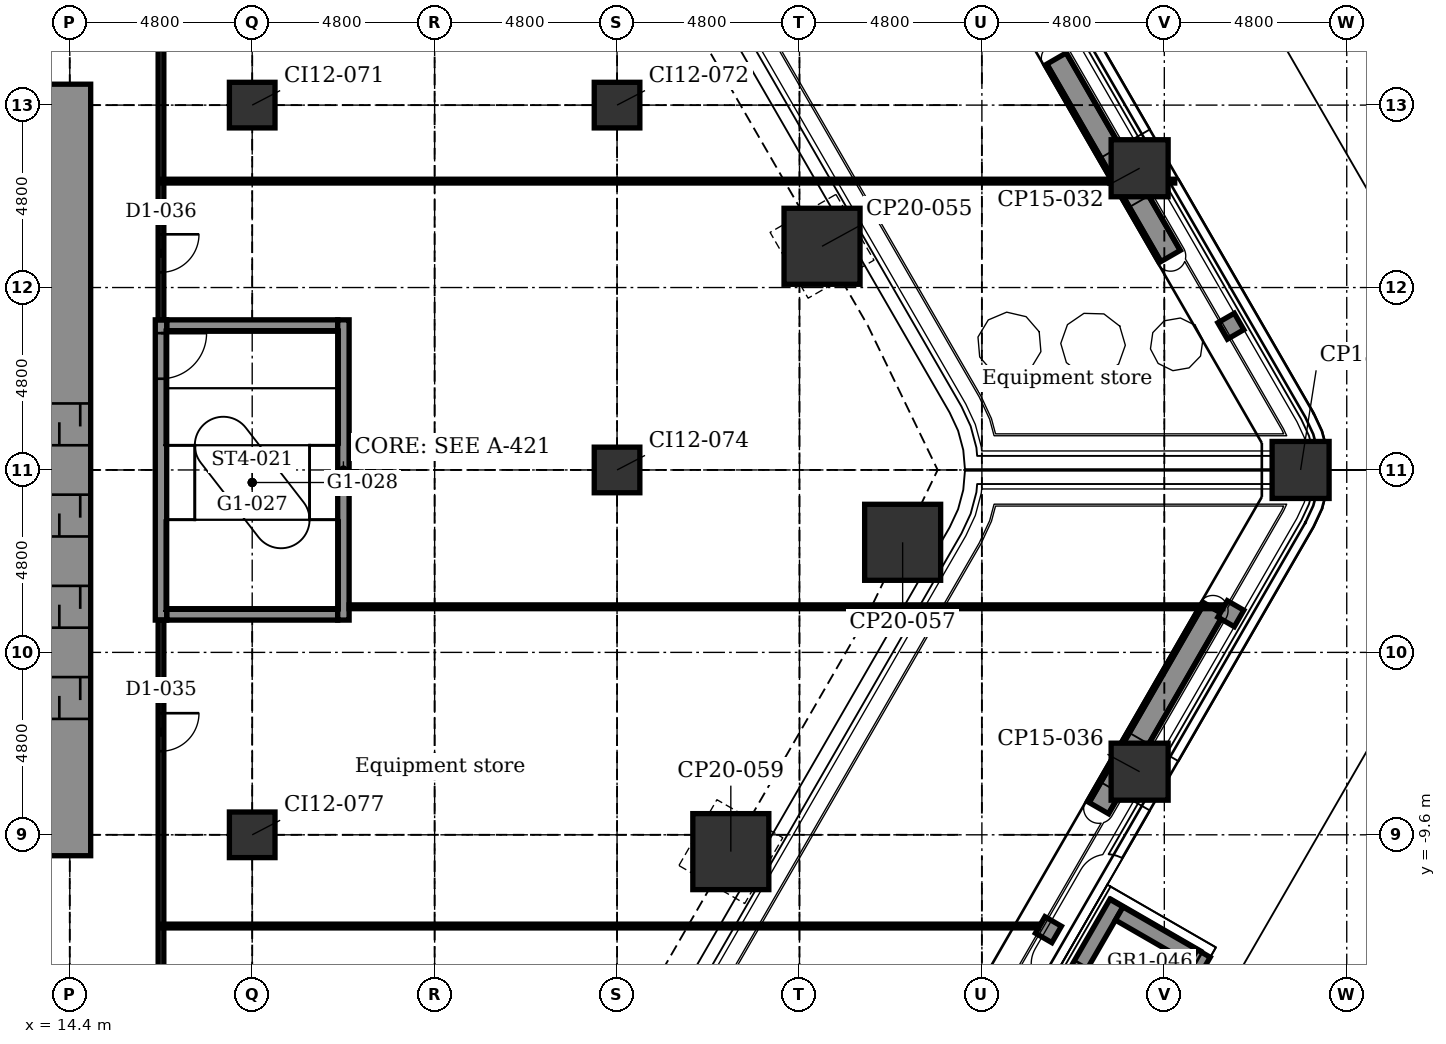
"""IFC4 building model, lengths in metres.
Left out: names, types, materials, properties, quantities, classifications, styles, units other than length and angle.
Written with IfcOpenShell. Run it as: python <this file> out.ifc"""

import sys

from ifc_helpers import new_model, si_unit, direction, frame, frame_2d, origin, origin_2d, place, context, subcontext, project, spatial, rectangle, extrude, element, fill, save


model = new_model("IFC4")
c1 = context("Model", 3, precision=1e-05, world=origin(), true_north=direction((0.0, 1.0)))
c2 = subcontext(c1, "Body", "Model", "MODEL_VIEW")
j1 = project(units=[si_unit("LENGTHUNIT", "METRE"), si_unit("PLANEANGLEUNIT", "RADIAN")], contexts=[c1])
p1 = place(None, origin())
s1 = spatial("IfcSite", under=j1, at=p1, CompositionType="ELEMENT")
p2 = place(p1, origin())
s2 = spatial("IfcBuilding", under=s1, at=p2, CompositionType="ELEMENT")
p3 = place(p2, frame((0.0, 0.0, 12.4)))
s3 = spatial("IfcBuildingStorey", under=s2, at=p3, CompositionType="ELEMENT", Elevation=12.4)
for number, where, z_axis, x_axis in (
    (1, (42.551, 7.939, -0.3), (0.0, 0.0, 1.0), (0.866, 0.5, 0.0)),
    (2, (46.786, 0.0, -0.3), (0.0, 0.0, 1.0), (1.0, 0.0, 0.0)),
    (3, (42.551, -7.939, -0.3), (0.0, 0.0, 1.0), (0.5, 0.866, 0.0)),
):
    element("IfcColumn", number, at=place(p3, frame(where, z_axis=z_axis, x_axis=x_axis)), inside=s3, PredefinedType="COLUMN", context=c2, shape_type="SweptSolid", body=[
        extrude(rectangle(XDim=1.5, YDim=1.5, at=origin_2d()), origin(), (0.0, 0.0, 1.0), 5.05),
    ])
for number, where, z_axis, x_axis in (
    (4, (34.194, 5.885, -0.3), (0.0, 0.0, 1.0), (0.866, 0.5, 0.0)),
    (5, (36.315, -1.904, -0.3), (0.0, 0.0, 1.0), (1.0, 0.0, 0.0)),
    (6, (31.794, -10.042, -0.3), (0.0, 0.0, 1.0), (0.5, 0.866, 0.0)),
):
    element("IfcColumn", number, at=place(p3, frame(where, z_axis=z_axis, x_axis=x_axis)), inside=s3, PredefinedType="COLUMN", context=c2, shape_type="SweptSolid", body=[
        extrude(rectangle(XDim=2.0, YDim=2.0, at=origin_2d()), origin(), (0.0, 0.0, 1.0), 5.05),
    ])
for number, where, z_axis, x_axis in (
    (7, (19.2, -9.6, -0.3), (0.0, 0.0, 1.0), (1.0, 0.0, 0.0)),
    (8, (19.2, 9.6, -0.3), (0.0, 0.0, 1.0), (1.0, 0.0, 0.0)),
    (9, (28.8, 0.0, -0.3), (0.0, 0.0, 1.0), (1.0, 0.0, 0.0)),
    (10, (28.8, 9.6, -0.3), (0.0, 0.0, 1.0), (1.0, 0.0, 0.0)),
):
    element("IfcColumn", number, at=place(p3, frame(where, z_axis=z_axis, x_axis=x_axis)), inside=s3, PredefinedType="COLUMN", context=c2, shape_type="SweptSolid", body=[
        extrude(rectangle(XDim=1.2, YDim=1.2, at=origin_2d()), origin(), (0.0, 0.0, 1.0), 5.05),
    ])
for number, where, z_axis, x_axis in (
    (11, (16.95, -3.8, -0.3), (0.0, 0.0, 1.0), (1.0, 0.0, 0.0)),
    (12, (16.95, 3.8, -0.3), (0.0, 0.0, 1.0), (1.0, 0.0, 0.0)),
):
    element("IfcWall", number, at=place(p3, frame(where, z_axis=z_axis, x_axis=x_axis)), inside=s3, PredefinedType="STANDARD", context=c2, shape_type="SweptSolid", body=[
        extrude(rectangle(XDim=4.5, YDim=0.3, at=frame_2d((2.25, 0.0))), origin(), (0.0, 0.0, 1.0), 5.05),
    ])
p4 = place(p3, frame((14.4, -10.15, -0.3), z_axis=(0.0, 0.0, 1.0), x_axis=(0.0, 1.0, 0.0)))
e13 = element("IfcWall", 13, at=p4, inside=s3, PredefinedType="SHEAR", context=c2, shape_type="SweptSolid", body=[
    extrude(rectangle(XDim=20.3, YDim=1.1, at=frame_2d((10.15, 0.0))), origin(), (0.0, 0.0, 1.0), 5.05),
])
p5 = place(p4, frame((3.6, 0.0, 0.3)))
e14 = element("IfcOpeningElement", 14, at=p5, cuts=e13, PredefinedType="OPENING", context=c2, shape_type="SweptSolid", body=[
    extrude(rectangle(XDim=1.1, YDim=2.1, at=frame_2d((0.55, 1.05))), frame((0.0, 0.56, 0.0), z_axis=(0.0, -1.0, 0.0), x_axis=(1.0, 0.0, 0.0)), (0.0, 0.0, 1.0), 1.12),
])
p6 = place(p4, frame((6.0, 0.0, 0.3)))
e15 = element("IfcOpeningElement", 15, at=p6, cuts=e13, PredefinedType="OPENING", context=c2, shape_type="SweptSolid", body=[
    extrude(rectangle(XDim=1.1, YDim=2.1, at=frame_2d((0.55, 1.05))), frame((0.0, 0.56, 0.0), z_axis=(0.0, -1.0, 0.0), x_axis=(1.0, 0.0, 0.0)), (0.0, 0.0, 1.0), 1.12),
])
p7 = place(p4, frame((8.4, 0.0, 0.3)))
e16 = element("IfcOpeningElement", 16, at=p7, cuts=e13, PredefinedType="OPENING", context=c2, shape_type="SweptSolid", body=[
    extrude(rectangle(XDim=1.1, YDim=2.1, at=frame_2d((0.55, 1.05))), frame((0.0, 0.56, 0.0), z_axis=(0.0, -1.0, 0.0), x_axis=(1.0, 0.0, 0.0)), (0.0, 0.0, 1.0), 1.12),
])
p8 = place(p4, frame((10.8, 0.0, 0.3)))
e17 = element("IfcOpeningElement", 17, at=p8, cuts=e13, PredefinedType="OPENING", context=c2, shape_type="SweptSolid", body=[
    extrude(rectangle(XDim=1.1, YDim=2.1, at=frame_2d((0.55, 1.05))), frame((0.0, 0.56, 0.0), z_axis=(0.0, -1.0, 0.0), x_axis=(1.0, 0.0, 0.0)), (0.0, 0.0, 1.0), 1.12),
])
p9 = place(p3, frame((16.8, -3.95, -0.3), z_axis=(0.0, 0.0, 1.0), x_axis=(0.0, 1.0, 0.0)))
e18 = element("IfcWall", 18, at=p9, inside=s3, PredefinedType="STANDARD", context=c2, shape_type="SweptSolid", body=[
    extrude(rectangle(XDim=7.9, YDim=0.3, at=frame_2d((3.95, 0.0))), origin(), (0.0, 0.0, 1.0), 5.05),
])
p10 = place(p9, frame((6.35, 0.0, 0.3)))
e19 = element("IfcOpeningElement", 19, at=p10, cuts=e18, PredefinedType="OPENING", context=c2, shape_type="SweptSolid", body=[
    extrude(rectangle(XDim=1.2, YDim=2.1, at=frame_2d((0.6, 1.05))), frame((0.0, 0.16, 0.0), z_axis=(0.0, -1.0, 0.0), x_axis=(1.0, 0.0, 0.0)), (0.0, 0.0, 1.0), 0.32),
])
p11 = place(p3, frame((21.6, -3.95, -0.3), z_axis=(0.0, 0.0, 1.0), x_axis=(0.0, 1.0, 0.0)))
e20 = element("IfcWall", 20, at=p11, inside=s3, PredefinedType="STANDARD", context=c2, shape_type="SweptSolid", body=[
    extrude(rectangle(XDim=7.9, YDim=0.3, at=frame_2d((3.95, 0.0))), origin(), (0.0, 0.0, 1.0), 5.05),
])
p12 = place(p3, frame((40.364, 10.826, 5.0), z_axis=(0.0, 0.0, 1.0), x_axis=(0.500007758305, -0.866020924479, 0.0)))
e21 = element("IfcWall", 21, at=p12, inside=s3, PredefinedType="USERDEFINED", context=c2, shape_type="SweptSolid", body=[
    extrude(rectangle(XDim=6.0, YDim=0.6, at=frame_2d((3.0, 0.0))), origin(), (0.0, 0.0, 1.0), 0.7),
])
p13 = place(p3, frame((44.508, -3.649, 5.0), z_axis=(0.0, 0.0, 1.0), x_axis=(-0.500003743768, -0.866023242308, 0.0)))
e22 = element("IfcWall", 22, at=p13, inside=s3, PredefinedType="USERDEFINED", context=c2, shape_type="SweptSolid", body=[
    extrude(rectangle(XDim=6.061, YDim=0.6, at=frame_2d((3.03, 0.0))), origin(), (0.0, 0.0, 1.0), 0.7),
])
for number, where, z_axis, x_axis in (
    (23, (44.235, -12.722, 0.45), (0.0, 0.0, 1.0), (-0.5, -0.866, 0.0)),
    (24, (41.94, -11.397, 0.45), (0.0, 0.0, 1.0), (-0.5, -0.866, 0.0)),
):
    element("IfcWall", number, at=place(p3, frame(where, z_axis=z_axis, x_axis=x_axis)), inside=s3, PredefinedType="SOLIDWALL", context=c2, shape_type="SweptSolid", body=[
        extrude(rectangle(XDim=2.1, YDim=0.4, at=frame_2d((1.05, 0.0))), origin(), (0.0, 0.0, 1.0), 4.35),
    ])
p14 = place(p3, frame((42.013, -11.67, 0.45), z_axis=(0.0, 0.0, 1.0), x_axis=(0.866017533419, -0.500013631625, 0.0)))
e25 = element("IfcWall", 25, at=p14, inside=s3, PredefinedType="SOLIDWALL", context=c2, shape_type="SweptSolid", body=[
    extrude(rectangle(XDim=2.25, YDim=0.4, at=frame_2d((1.125, 0.0))), origin(), (0.0, 0.0, 1.0), 4.35),
])
for number, where, z_axis, x_axis in (
    (26, (44.825, 3.999, 0.0), (0.0, 0.0, 1.0), (0.5, -0.866, 0.0)),
    (27, (45.075, -3.565, 0.0), (0.0, 0.0, 1.0), (-0.5, -0.866, 0.0)),
    (28, (40.275, -11.879, 0.0), (0.0, 0.0, 1.0), (-0.5, -0.866, 0.0)),
):
    element("IfcWall", number, at=place(p3, frame(where, z_axis=z_axis, x_axis=x_axis)), inside=s3, PredefinedType="SOLIDWALL", context=c2, shape_type="SweptSolid", body=[
        extrude(rectangle(XDim=0.5, YDim=0.5, at=frame_2d((0.25, 0.0))), origin(), (0.0, 0.0, 1.0), 4.45),
    ])
p15 = place(p3, frame((16.8, -13.6, 0.0), z_axis=(0.0, 0.0, 1.0), x_axis=(0.0, 1.0, 0.0)))
e29 = element("IfcWall", 29, at=p15, inside=s3, PredefinedType="PARTITIONING", context=c2, shape_type="SweptSolid", body=[
    extrude(rectangle(XDim=9.65, YDim=0.15, at=frame_2d((4.825, 0.0))), origin(), (0.0, 0.0, 1.0), 4.7),
])
p16 = place(p15, frame((6.2, 0.0, 0.0)))
e30 = element("IfcOpeningElement", 30, at=p16, cuts=e29, PredefinedType="OPENING", context=c2, shape_type="SweptSolid", body=[
    extrude(rectangle(XDim=1.0, YDim=2.1, at=frame_2d((0.5, 1.05))), frame((0.0, 0.085, 0.0), z_axis=(0.0, -1.0, 0.0), x_axis=(1.0, 0.0, 0.0)), (0.0, 0.0, 1.0), 0.17),
])
p17 = place(p3, frame((16.8, 3.95, 0.0), z_axis=(0.0, 0.0, 1.0), x_axis=(0.0, 1.0, 0.0)))
e31 = element("IfcWall", 31, at=p17, inside=s3, PredefinedType="PARTITIONING", context=c2, shape_type="SweptSolid", body=[
    extrude(rectangle(XDim=10.85, YDim=0.15, at=frame_2d((5.425, 0.0))), origin(), (0.0, 0.0, 1.0), 4.7),
])
p18 = place(p17, frame((1.25, 0.0, 0.0)))
e32 = element("IfcOpeningElement", 32, at=p18, cuts=e31, PredefinedType="OPENING", context=c2, shape_type="SweptSolid", body=[
    extrude(rectangle(XDim=1.0, YDim=2.1, at=frame_2d((0.5, 1.05))), frame((0.0, 0.085, 0.0), z_axis=(0.0, -1.0, 0.0), x_axis=(1.0, 0.0, 0.0)), (0.0, 0.0, 1.0), 0.17),
])
p19 = place(p17, frame((7.95, 0.0, 0.0)))
e33 = element("IfcOpeningElement", 33, at=p19, cuts=e31, PredefinedType="OPENING", context=c2, shape_type="SweptSolid", body=[
    extrude(rectangle(XDim=1.0, YDim=2.1, at=frame_2d((0.5, 1.05))), frame((0.0, 0.085, 0.0), z_axis=(0.0, -1.0, 0.0), x_axis=(1.0, 0.0, 0.0)), (0.0, 0.0, 1.0), 0.17),
])
p20 = place(p3, frame((16.8, -12.0, 0.0), z_axis=(0.0, 0.0, 1.0), x_axis=(1.0, 0.0, 0.0)))
e34 = element("IfcWall", 34, at=p20, inside=s3, PredefinedType="PARTITIONING", context=c2, shape_type="SweptSolid", body=[
    extrude(rectangle(XDim=23.088, YDim=0.1, at=frame_2d((11.544, 0.0))), origin(), (0.0, 0.0, 1.0), 4.7),
])
p21 = place(p3, frame((21.75, -3.6, 0.0), z_axis=(0.0, 0.0, 1.0), x_axis=(1.0, 0.0, 0.0)))
e35 = element("IfcWall", 35, at=p21, inside=s3, PredefinedType="PARTITIONING", context=c2, shape_type="SweptSolid", body=[
    extrude(rectangle(XDim=22.988, YDim=0.1, at=frame_2d((11.494, 0.0))), origin(), (0.0, 0.0, 1.0), 4.7),
])
p22 = place(p3, frame((16.8, 7.6, 0.0), z_axis=(0.0, 0.0, 1.0), x_axis=(1.0, 0.0, 0.0)))
e36 = element("IfcWall", 36, at=p22, inside=s3, PredefinedType="PARTITIONING", context=c2, shape_type="SweptSolid", body=[
    extrude(rectangle(XDim=26.674, YDim=0.1, at=frame_2d((13.337, 0.0))), origin(), (0.0, 0.0, 1.0), 4.7),
])
p23 = place(p16, frame((1.0, 0.0, 0.0), z_axis=(0.0, 0.0, 1.0), x_axis=(-1.0, 0.0, 0.0)))
e37 = element("IfcDoor", 37, at=p23, inside=s3, OperationType="SINGLE_SWING_RIGHT", PredefinedType="DOOR", context=c2, shape_type="SweptSolid", body=[
    extrude(rectangle(XDim=1.0, YDim=2.1, at=frame_2d((0.5, 1.05))), frame((0.0, 0.025, 0.0), z_axis=(0.0, -1.0, 0.0), x_axis=(1.0, 0.0, 0.0)), (0.0, 0.0, 1.0), 0.05),
])
fill(e30, e37)
p24 = place(p18, frame((1.0, 0.0, 0.0), z_axis=(0.0, 0.0, 1.0), x_axis=(-1.0, 0.0, 0.0)))
e38 = element("IfcDoor", 38, at=p24, inside=s3, OperationType="SINGLE_SWING_RIGHT", PredefinedType="DOOR", context=c2, shape_type="SweptSolid", body=[
    extrude(rectangle(XDim=1.0, YDim=2.1, at=frame_2d((0.5, 1.05))), frame((0.0, 0.025, 0.0), z_axis=(0.0, -1.0, 0.0), x_axis=(1.0, 0.0, 0.0)), (0.0, 0.0, 1.0), 0.05),
])
fill(e32, e38)
p25 = place(p5, origin())
e39 = element("IfcDoor", 39, at=p25, inside=s3, OperationType="DOUBLE_DOOR_SLIDING", PredefinedType="DOOR", context=c2, shape_type="SweptSolid", body=[
    extrude(rectangle(XDim=1.1, YDim=2.1, at=frame_2d((0.55, 1.05))), frame((0.0, 0.025, 0.0), z_axis=(0.0, -1.0, 0.0), x_axis=(1.0, 0.0, 0.0)), (0.0, 0.0, 1.0), 0.05),
])
fill(e14, e39)
p26 = place(p6, origin())
e40 = element("IfcDoor", 40, at=p26, inside=s3, OperationType="DOUBLE_DOOR_SLIDING", PredefinedType="DOOR", context=c2, shape_type="SweptSolid", body=[
    extrude(rectangle(XDim=1.1, YDim=2.1, at=frame_2d((0.55, 1.05))), frame((0.0, 0.025, 0.0), z_axis=(0.0, -1.0, 0.0), x_axis=(1.0, 0.0, 0.0)), (0.0, 0.0, 1.0), 0.05),
])
fill(e15, e40)
p27 = place(p7, origin())
e41 = element("IfcDoor", 41, at=p27, inside=s3, OperationType="DOUBLE_DOOR_SLIDING", PredefinedType="DOOR", context=c2, shape_type="SweptSolid", body=[
    extrude(rectangle(XDim=1.1, YDim=2.1, at=frame_2d((0.55, 1.05))), frame((0.0, 0.025, 0.0), z_axis=(0.0, -1.0, 0.0), x_axis=(1.0, 0.0, 0.0)), (0.0, 0.0, 1.0), 0.05),
])
fill(e16, e41)
p28 = place(p8, origin())
e42 = element("IfcDoor", 42, at=p28, inside=s3, OperationType="DOUBLE_DOOR_SLIDING", PredefinedType="DOOR", context=c2, shape_type="SweptSolid", body=[
    extrude(rectangle(XDim=1.1, YDim=2.1, at=frame_2d((0.55, 1.05))), frame((0.0, 0.025, 0.0), z_axis=(0.0, -1.0, 0.0), x_axis=(1.0, 0.0, 0.0)), (0.0, 0.0, 1.0), 0.05),
])
fill(e17, e42)
p29 = place(p10, frame((1.2, 0.0, 0.0), z_axis=(0.0, 0.0, 1.0), x_axis=(-1.0, 0.0, 0.0)))
e43 = element("IfcDoor", 43, at=p29, inside=s3, OperationType="SINGLE_SWING_RIGHT", PredefinedType="DOOR", context=c2, shape_type="SweptSolid", body=[
    extrude(rectangle(XDim=1.2, YDim=2.1, at=frame_2d((0.6, 1.05))), frame((0.0, 0.025, 0.0), z_axis=(0.0, -1.0, 0.0), x_axis=(1.0, 0.0, 0.0)), (0.0, 0.0, 1.0), 0.05),
])
fill(e19, e43)
save(model, sys.argv[1])
